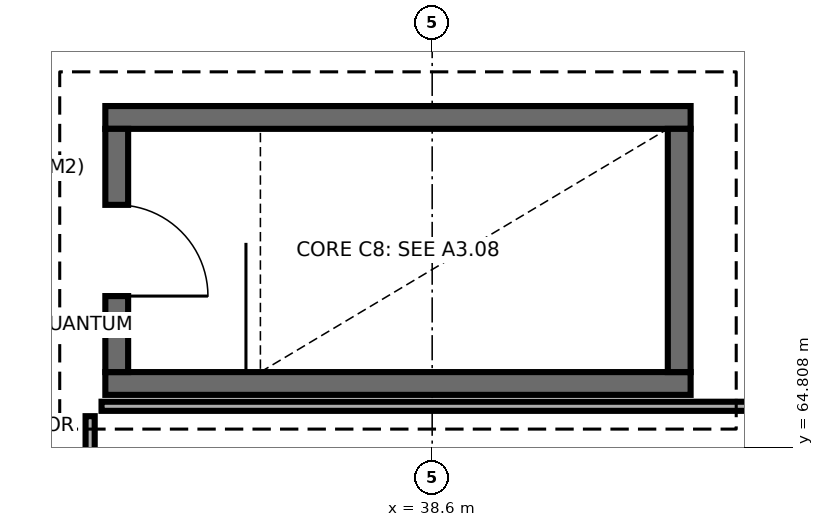
"""IFC4 building model, lengths in metres.
Left out: names, types, materials, properties, quantities, classifications, styles, units other than length and angle.
Written with IfcOpenShell. Run it as: python <this file> out.ifc"""

import sys

from ifc_helpers import new_model, si_unit, direction, frame, frame_2d, origin, place, context, subcontext, project, spatial, rectangle, extrude, element, fill, save


model = new_model("IFC4")
c1 = context("Model", 3, precision=1e-05, world=origin(), true_north=direction((0.0, 1.0)))
c2 = subcontext(c1, "Body", "Model", "MODEL_VIEW")
j1 = project(units=[si_unit("LENGTHUNIT", "METRE"), si_unit("PLANEANGLEUNIT", "RADIAN")], contexts=[c1])
p1 = place(None, origin())
s1 = spatial("IfcSite", under=j1, at=p1, CompositionType="ELEMENT")
p2 = place(p1, origin())
s2 = spatial("IfcBuilding", under=s1, at=p2, CompositionType="ELEMENT")
p3 = place(p2, frame((0.0, 0.0, 30.6)))
s3 = spatial("IfcBuildingStorey", under=s2, at=p3, CompositionType="ELEMENT", Elevation=30.6)
for number, where, z_axis, x_axis in (
    (1, (34.3, 65.65, 0.0), (0.0, 0.0, 1.0), (1.0, 0.0, 0.0)),
    (2, (42.0, 69.15, 0.0), (0.0, 0.0, 1.0), (-1.0, 0.0, 0.0)),
):
    element("IfcWall", number, at=place(p3, frame(where, z_axis=z_axis, x_axis=x_axis)), inside=s3, PredefinedType="SHEAR", context=c2, shape_type="SweptSolid", body=[
        extrude(rectangle(XDim=7.7, YDim=0.3, at=frame_2d((3.85, 0.0))), origin(), (0.0, 0.0, 1.0), 3.9),
    ])
p4 = place(p3, frame((34.45, 69.0, 0.0), z_axis=(0.0, 0.0, 1.0), x_axis=(0.0, -1.0, 0.0)))
e3 = element("IfcWall", 3, at=p4, inside=s3, PredefinedType="SHEAR", context=c2, shape_type="SweptSolid", body=[
    extrude(rectangle(XDim=3.2, YDim=0.3, at=frame_2d((1.6, 0.0))), origin(), (0.0, 0.0, 1.0), 3.9),
])
p5 = place(p4, frame((1.0, 0.0, 0.0)))
e4 = element("IfcOpeningElement", 4, at=p5, cuts=e3, PredefinedType="OPENING", context=c2, shape_type="SweptSolid", body=[
    extrude(rectangle(XDim=1.2, YDim=2.15, at=frame_2d((0.6, 1.075))), frame((0.0, 0.16, 0.0), z_axis=(0.0, -1.0, 0.0), x_axis=(1.0, 0.0, 0.0)), (0.0, 0.0, 1.0), 0.32),
])
p6 = place(p3, frame((41.85, 65.8, 0.0), z_axis=(0.0, 0.0, 1.0), x_axis=(0.0, 1.0, 0.0)))
e5 = element("IfcWall", 5, at=p6, inside=s3, PredefinedType="SHEAR", context=c2, shape_type="SweptSolid", body=[
    extrude(rectangle(XDim=3.2, YDim=0.3, at=frame_2d((1.6, 0.0))), origin(), (0.0, 0.0, 1.0), 3.9),
])
p7 = place(p3, frame((34.1, 61.5, 0.0), z_axis=(0.0, 0.0, 1.0), x_axis=(0.0, 1.0, 0.0)))
e6 = element("IfcWall", 6, at=p7, inside=s3, PredefinedType="PARTITIONING", context=c2, shape_type="SweptSolid", body=[
    extrude(rectangle(XDim=3.72, YDim=0.12, at=frame_2d((1.86, 0.0))), origin(), (0.0, 0.0, 1.0), 3.7),
])
p8 = place(p7, frame((1.41, 0.0, 0.0)))
e7 = element("IfcOpeningElement", 7, at=p8, cuts=e6, PredefinedType="OPENING", context=c2, shape_type="SweptSolid", body=[
    extrude(rectangle(XDim=0.9, YDim=2.1, at=frame_2d((0.45, 1.05))), frame((0.0, 0.07, 0.0), z_axis=(0.0, -1.0, 0.0), x_axis=(1.0, 0.0, 0.0)), (0.0, 0.0, 1.0), 0.14),
])
p9 = place(p3, frame((34.25, 65.35, 0.0), z_axis=(0.0, 0.0, 1.0), x_axis=(1.0, 0.0, 0.0)))
e8 = element("IfcWall", 8, at=p9, inside=s3, PredefinedType="PARTITIONING", context=c2, shape_type="SweptSolid", body=[
    extrude(rectangle(XDim=12.865, YDim=0.12, at=frame_2d((6.433, 0.0))), origin(), (0.0, 0.0, 1.0), 3.7),
])
p10 = place(p5, origin())
e9 = element("IfcDoor", 9, at=p10, inside=s3, OperationType="SINGLE_SWING_RIGHT", PredefinedType="DOOR", context=c2, shape_type="SweptSolid", body=[
    extrude(rectangle(XDim=1.2, YDim=2.15, at=frame_2d((0.6, 1.075))), frame((0.0, 0.025, 0.0), z_axis=(0.0, -1.0, 0.0), x_axis=(1.0, 0.0, 0.0)), (0.0, 0.0, 1.0), 0.05),
])
fill(e4, e9)
save(model, sys.argv[1])
